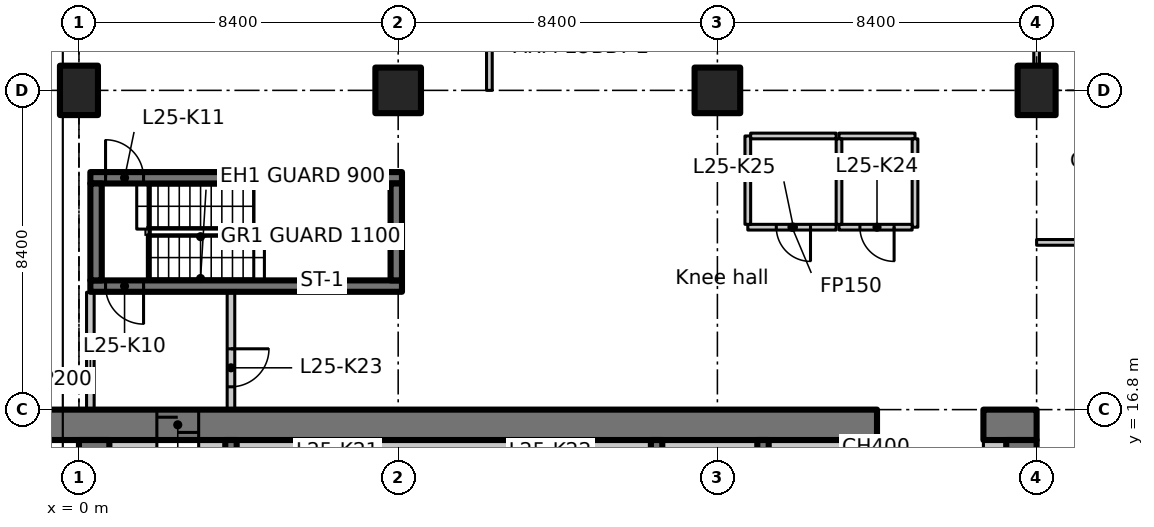
"""IFC4 building model, lengths in metres.
Left out: names, types, materials, properties, quantities, classifications, styles, units other than length and angle.
Written with IfcOpenShell. Run it as: python <this file> out.ifc"""

import sys

from ifc_helpers import new_model, si_unit, direction, frame, frame_2d, origin, origin_2d, place, context, subcontext, project, spatial, polyline, rectangle, outline, extrude, element, fill, save


model = new_model("IFC4")
c1 = context("Model", 3, precision=1e-05, world=origin(), true_north=direction((0.0, 1.0)))
c2 = subcontext(c1, "Body", "Model", "MODEL_VIEW")
j1 = project(units=[si_unit("LENGTHUNIT", "METRE"), si_unit("PLANEANGLEUNIT", "RADIAN")], contexts=[c1])
p1 = place(None, origin())
s1 = spatial("IfcSite", under=j1, at=p1, CompositionType="ELEMENT")
p2 = place(p1, origin())
s2 = spatial("IfcBuilding", under=s1, at=p2, CompositionType="ELEMENT")
p3 = place(p2, frame((0.0, 0.0, 106.1)))
s3 = spatial("IfcBuildingStorey", under=s2, at=p3, CompositionType="ELEMENT", Elevation=106.1)
p4 = place(p3, frame((0.0, 25.2, 0.0), z_axis=(0.0, 0.0, 1.0), x_axis=(1.0, 0.0, 0.0)))
e1 = element("IfcColumn", 1, at=p4, inside=s3, PredefinedType="COLUMN", context=c2, shape_type="SweptSolid", body=[
    extrude(rectangle(XDim=1.0, YDim=1.3, at=origin_2d()), origin(), (0.0, 0.0, 1.0), 3.35),
])
for number, where, z_axis, x_axis in (
    (2, (8.4, 25.2, 0.0), (0.0, 0.0, 1.0), (1.0, 0.0, 0.0)),
    (3, (16.8, 25.2, 0.0), (0.0, 0.0, 1.0), (1.0, 0.0, 0.0)),
):
    element("IfcColumn", number, at=place(p3, frame(where, z_axis=z_axis, x_axis=x_axis)), inside=s3, PredefinedType="COLUMN", context=c2, shape_type="SweptSolid", body=[
        extrude(rectangle(XDim=1.2, YDim=1.2, at=origin_2d()), origin(), (0.0, 0.0, 1.0), 3.35),
    ])
p5 = place(p3, frame((25.2, 25.2, 0.0), z_axis=(0.0, 0.0, 1.0), x_axis=(1.0, 0.0, 0.0)))
e4 = element("IfcColumn", 4, at=p5, inside=s3, PredefinedType="COLUMN", context=c2, shape_type="SweptSolid", body=[
    extrude(rectangle(XDim=1.0, YDim=1.3, at=origin_2d()), origin(), (0.0, 0.0, 1.0), 3.35),
])
p6 = place(p3, frame((-1.1, 16.4, 0.0), z_axis=(0.0, 0.0, 1.0), x_axis=(1.0, 0.0, 0.0)))
e5 = element("IfcWall", 5, at=p6, inside=s3, PredefinedType="SHEAR", context=c2, shape_type="SweptSolid", body=[
    extrude(rectangle(XDim=22.1, YDim=0.8, at=frame_2d((11.05, 0.0))), origin(), (0.0, 0.0, 1.0), 3.35),
])
p7 = place(p6, frame((3.15, 0.0, 0.0)))
e6 = element("IfcOpeningElement", 6, at=p7, cuts=e5, PredefinedType="OPENING", context=c2, shape_type="SweptSolid", body=[
    extrude(rectangle(XDim=1.1, YDim=2.3, at=frame_2d((0.55, 1.15))), frame((0.0, 0.41, 0.0), z_axis=(0.0, -1.0, 0.0), x_axis=(1.0, 0.0, 0.0)), (0.0, 0.0, 1.0), 0.82),
])
p8 = place(p3, frame((23.8, 16.4, 0.0), z_axis=(0.0, 0.0, 1.0), x_axis=(1.0, 0.0, 0.0)))
e7 = element("IfcWall", 7, at=p8, inside=s3, PredefinedType="SHEAR", context=c2, shape_type="SweptSolid", body=[
    extrude(rectangle(XDim=1.4, YDim=0.8, at=frame_2d((0.7, 0.0))), origin(), (0.0, 0.0, 1.0), 3.35),
])
p9 = place(p3, frame((0.4, 7.136, 0.0), z_axis=(0.0, 0.0, 1.0), x_axis=(0.0, 1.0, 0.0)))
e8 = element("IfcWall", 8, at=p9, inside=s3, PredefinedType="SHEAR", context=c2, shape_type="SweptSolid", body=[
    extrude(rectangle(XDim=8.864, YDim=0.8, at=frame_2d((4.432, 0.0))), origin(), (0.0, 0.0, 1.0), 3.35),
])
p10 = place(p3, frame((24.8, 12.6, 0.0), z_axis=(0.0, 0.0, 1.0), x_axis=(0.0, 1.0, 0.0)))
e9 = element("IfcWall", 9, at=p10, inside=s3, PredefinedType="SHEAR", context=c2, shape_type="SweptSolid", body=[
    extrude(rectangle(XDim=3.4, YDim=0.8, at=frame_2d((1.7, 0.0))), origin(), (0.0, 0.0, 1.0), 3.35),
])
p11 = place(p3, frame((0.8, 15.8, 0.0), z_axis=(0.0, 0.0, 1.0), x_axis=(1.0, 0.0, 0.0)))
e10 = element("IfcWall", 10, at=p11, inside=s3, PredefinedType="PARTITIONING", context=c2, shape_type="SweptSolid", body=[
    extrude(rectangle(XDim=1.25, YDim=0.4, at=frame_2d((0.625, 0.0))), origin(), (0.0, 0.0, 1.0), 3.35),
])
p12 = place(p3, frame((23.8, 15.8, 0.0), z_axis=(0.0, 0.0, 1.0), x_axis=(1.0, 0.0, 0.0)))
e11 = element("IfcWall", 11, at=p12, inside=s3, PredefinedType="PARTITIONING", context=c2, shape_type="SweptSolid", body=[
    extrude(rectangle(XDim=0.6, YDim=0.4, at=frame_2d((0.3, 0.0))), origin(), (0.0, 0.0, 1.0), 3.35),
])
for number, where, z_axis, x_axis in (
    (12, (4.0, 12.95, 0.0), (0.0, 0.0, 1.0), (0.0, 1.0, 0.0)),
    (13, (15.2, 12.95, 0.0), (0.0, 0.0, 1.0), (0.0, 1.0, 0.0)),
    (14, (18.0, 12.95, 0.0), (0.0, 0.0, 1.0), (0.0, 1.0, 0.0)),
    (15, (20.8, 12.95, 0.0), (0.0, 0.0, 1.0), (0.0, 1.0, 0.0)),
):
    element("IfcWall", number, at=place(p3, frame(where, z_axis=z_axis, x_axis=x_axis)), inside=s3, PredefinedType="SHEAR", context=c2, shape_type="SweptSolid", body=[
        extrude(rectangle(XDim=3.05, YDim=0.3, at=frame_2d((1.525, 0.0))), origin(), (0.0, 0.0, 1.0), 3.35),
    ])
p13 = place(p3, frame((8.5, 20.05, 0.0), z_axis=(0.0, 0.0, 1.0), x_axis=(-1.0, 0.0, 0.0)))
e16 = element("IfcWall", 16, at=p13, inside=s3, PredefinedType="SHEAR", context=c2, shape_type="SweptSolid", body=[
    extrude(rectangle(XDim=8.2, YDim=0.3, at=frame_2d((4.1, 0.0))), origin(), (0.0, 0.0, 1.0), 3.35),
])
p14 = place(p13, frame((6.8, 0.0, 0.0)))
e17 = element("IfcOpeningElement", 17, at=p14, cuts=e16, PredefinedType="OPENING", context=c2, shape_type="SweptSolid", body=[
    extrude(rectangle(XDim=1.0, YDim=2.1, at=frame_2d((0.5, 1.05))), frame((0.0, 0.16, 0.0), z_axis=(0.0, -1.0, 0.0), x_axis=(1.0, 0.0, 0.0)), (0.0, 0.0, 1.0), 0.32),
])
p15 = place(p3, frame((0.3, 22.9, 0.0), z_axis=(0.0, 0.0, 1.0), x_axis=(1.0, 0.0, 0.0)))
e18 = element("IfcWall", 18, at=p15, inside=s3, PredefinedType="SHEAR", context=c2, shape_type="SweptSolid", body=[
    extrude(rectangle(XDim=8.2, YDim=0.3, at=frame_2d((4.1, 0.0))), origin(), (0.0, 0.0, 1.0), 3.35),
])
p16 = place(p15, frame((0.4, 0.0, 0.0)))
e19 = element("IfcOpeningElement", 19, at=p16, cuts=e18, PredefinedType="OPENING", context=c2, shape_type="SweptSolid", body=[
    extrude(rectangle(XDim=1.0, YDim=2.1, at=frame_2d((0.5, 1.05))), frame((0.0, 0.16, 0.0), z_axis=(0.0, -1.0, 0.0), x_axis=(1.0, 0.0, 0.0)), (0.0, 0.0, 1.0), 0.32),
])
for number, where, z_axis, x_axis in (
    (20, (0.45, 20.2, 0.0), (0.0, 0.0, 1.0), (0.0, 1.0, 0.0)),
    (21, (8.35, 20.2, 0.0), (0.0, 0.0, 1.0), (0.0, 1.0, 0.0)),
):
    element("IfcWall", number, at=place(p3, frame(where, z_axis=z_axis, x_axis=x_axis)), inside=s3, PredefinedType="SHEAR", context=c2, shape_type="SweptSolid", body=[
        extrude(rectangle(XDim=2.55, YDim=0.3, at=frame_2d((1.275, 0.0))), origin(), (0.0, 0.0, 1.0), 3.35),
    ])
p17 = place(p3, frame((0.3, 16.812, 0.0), z_axis=(0.0, 0.0, 1.0), x_axis=(0.0, 1.0, 0.0)))
e22 = element("IfcWall", 22, at=p17, inside=s3, PredefinedType="PARTITIONING", context=c2, shape_type="SweptSolid", body=[
    extrude(rectangle(XDim=3.076, YDim=0.2, at=frame_2d((1.538, 0.0))), origin(), (0.0, 0.0, 1.0), 2.98),
])
p18 = place(p3, frame((4.0, 19.888, 0.0), z_axis=(0.0, 0.0, 1.0), x_axis=(0.0, -1.0, 0.0)))
e23 = element("IfcWall", 23, at=p18, inside=s3, PredefinedType="PARTITIONING", context=c2, shape_type="SweptSolid", body=[
    extrude(rectangle(XDim=3.076, YDim=0.2, at=frame_2d((1.538, 0.0))), origin(), (0.0, 0.0, 1.0), 3.35),
])
p19 = place(p18, frame((1.488, 0.0, 0.0)))
e24 = element("IfcOpeningElement", 24, at=p19, cuts=e23, PredefinedType="OPENING", context=c2, shape_type="SweptSolid", body=[
    extrude(rectangle(XDim=1.0, YDim=2.1, at=frame_2d((0.5, 1.05))), frame((0.0, 0.11, 0.0), z_axis=(0.0, -1.0, 0.0), x_axis=(1.0, 0.0, 0.0)), (0.0, 0.0, 1.0), 0.22),
])
p20 = place(p3, frame((20.0, 24.0, 0.0), z_axis=(0.0, 0.0, 1.0), x_axis=(1.0, 0.0, 0.0)))
e25 = element("IfcWall", 25, at=p20, inside=s3, PredefinedType="PARTITIONING", context=c2, shape_type="SweptSolid", body=[
    extrude(rectangle(XDim=2.0, YDim=0.15, at=frame_2d((1.0, 0.0))), origin(), (0.0, 0.0, 1.0), 3.35),
])
p21 = place(p3, frame((22.0, 23.925, 0.0), z_axis=(0.0, 0.0, 1.0), x_axis=(0.0, -1.0, 0.0)))
e26 = element("IfcWall", 26, at=p21, inside=s3, PredefinedType="PARTITIONING", context=c2, shape_type="SweptSolid", body=[
    extrude(rectangle(XDim=2.325, YDim=0.15, at=frame_2d((1.163, 0.0))), origin(), (0.0, 0.0, 1.0), 3.35),
])
p22 = place(p3, frame((21.925, 21.6, 0.0), z_axis=(0.0, 0.0, 1.0), x_axis=(-1.0, 0.0, 0.0)))
e27 = element("IfcWall", 27, at=p22, inside=s3, PredefinedType="PARTITIONING", context=c2, shape_type="SweptSolid", body=[
    extrude(rectangle(XDim=1.925, YDim=0.15, at=frame_2d((0.962, 0.0))), origin(), (0.0, 0.0, 1.0), 3.35),
])
p23 = place(p22, frame((0.475, 0.0, 0.0)))
e28 = element("IfcOpeningElement", 28, at=p23, cuts=e27, PredefinedType="OPENING", context=c2, shape_type="SweptSolid", body=[
    extrude(rectangle(XDim=0.9, YDim=2.1, at=frame_2d((0.45, 1.05))), frame((0.0, 0.085, 0.0), z_axis=(0.0, -1.0, 0.0), x_axis=(1.0, 0.0, 0.0)), (0.0, 0.0, 1.0), 0.17),
])
p24 = place(p3, frame((20.0, 21.675, 0.0), z_axis=(0.0, 0.0, 1.0), x_axis=(0.0, 1.0, 0.0)))
e29 = element("IfcWall", 29, at=p24, inside=s3, PredefinedType="PARTITIONING", context=c2, shape_type="SweptSolid", body=[
    extrude(rectangle(XDim=2.25, YDim=0.15, at=frame_2d((1.125, 0.0))), origin(), (0.0, 0.0, 1.0), 3.35),
])
p25 = place(p3, frame((19.925, 21.6, 0.0), z_axis=(0.0, 0.0, 1.0), x_axis=(-1.0, 0.0, 0.0)))
e30 = element("IfcWall", 30, at=p25, inside=s3, PredefinedType="PARTITIONING", context=c2, shape_type="SweptSolid", body=[
    extrude(rectangle(XDim=2.325, YDim=0.15, at=frame_2d((1.163, 0.0))), origin(), (0.0, 0.0, 1.0), 3.35),
])
p26 = place(p25, frame((0.675, 0.0, 0.0)))
e31 = element("IfcOpeningElement", 31, at=p26, cuts=e30, PredefinedType="OPENING", context=c2, shape_type="SweptSolid", body=[
    extrude(rectangle(XDim=0.9, YDim=2.1, at=frame_2d((0.45, 1.05))), frame((0.0, 0.085, 0.0), z_axis=(0.0, -1.0, 0.0), x_axis=(1.0, 0.0, 0.0)), (0.0, 0.0, 1.0), 0.17),
])
p27 = place(p3, frame((17.6, 21.675, 0.0), z_axis=(0.0, 0.0, 1.0), x_axis=(0.0, 1.0, 0.0)))
e32 = element("IfcWall", 32, at=p27, inside=s3, PredefinedType="PARTITIONING", context=c2, shape_type="SweptSolid", body=[
    extrude(rectangle(XDim=2.325, YDim=0.15, at=frame_2d((1.163, 0.0))), origin(), (0.0, 0.0, 1.0), 3.35),
])
p28 = place(p3, frame((17.675, 24.0, 0.0), z_axis=(0.0, 0.0, 1.0), x_axis=(1.0, 0.0, 0.0)))
e33 = element("IfcWall", 33, at=p28, inside=s3, PredefinedType="PARTITIONING", context=c2, shape_type="SweptSolid", body=[
    extrude(rectangle(XDim=2.25, YDim=0.15, at=frame_2d((1.125, 0.0))), origin(), (0.0, 0.0, 1.0), 3.35),
])
p29 = place(p3, frame((3.15, 15.8, 0.0), z_axis=(0.0, 0.0, 1.0), x_axis=(1.0, 0.0, 0.0)))
e34 = element("IfcWall", 34, at=p29, inside=s3, PredefinedType="PARTITIONING", context=c2, shape_type="SweptSolid", body=[
    extrude(rectangle(XDim=0.7, YDim=0.4, at=frame_2d((0.35, 0.0))), origin(), (0.0, 0.0, 1.0), 3.35),
])
p30 = place(p3, frame((4.15, 15.8, 0.0), z_axis=(0.0, 0.0, 1.0), x_axis=(1.0, 0.0, 0.0)))
e35 = element("IfcWall", 35, at=p30, inside=s3, PredefinedType="PARTITIONING", context=c2, shape_type="SweptSolid", body=[
    extrude(rectangle(XDim=10.9, YDim=0.4, at=frame_2d((5.45, 0.0))), origin(), (0.0, 0.0, 1.0), 3.35),
])
for number, where, z_axis, x_axis in (
    (36, (15.35, 15.8, 0.0), (0.0, 0.0, 1.0), (1.0, 0.0, 0.0)),
    (37, (18.15, 15.8, 0.0), (0.0, 0.0, 1.0), (1.0, 0.0, 0.0)),
):
    element("IfcWall", number, at=place(p3, frame(where, z_axis=z_axis, x_axis=x_axis)), inside=s3, PredefinedType="PARTITIONING", context=c2, shape_type="SweptSolid", body=[
        extrude(rectangle(XDim=2.5, YDim=0.4, at=frame_2d((1.25, 0.0))), origin(), (0.0, 0.0, 1.0), 3.35),
    ])
p31 = place(p3, frame((20.95, 15.8, 0.0), z_axis=(0.0, 0.0, 1.0), x_axis=(1.0, 0.0, 0.0)))
e38 = element("IfcWall", 38, at=p31, inside=s3, PredefinedType="PARTITIONING", context=c2, shape_type="SweptSolid", body=[
    extrude(rectangle(XDim=0.05, YDim=0.4, at=frame_2d((0.025, 0.0))), origin(), (0.0, 0.0, 1.0), 3.35),
])
p32 = place(p3, frame((25.2, 21.2, 0.0), z_axis=(0.0, 0.0, 1.0), x_axis=(1.0, 0.0, 0.0)))
e39 = element("IfcWall", 39, at=p32, inside=s3, PredefinedType="PARTITIONING", context=c2, shape_type="SweptSolid", body=[
    extrude(rectangle(XDim=4.2, YDim=0.15, at=frame_2d((2.1, 0.0))), origin(), (0.0, 0.0, 1.0), 3.33),
])
p33 = place(p3, frame((25.2, 31.0, 0.0), z_axis=(0.0, 0.0, 1.0), x_axis=(0.0, -1.0, 0.0)))
e40 = element("IfcWall", 40, at=p33, inside=s3, PredefinedType="PARTITIONING", context=c2, shape_type="SweptSolid", body=[
    extrude(outline(polyline([(0.0, 0.0), (5.13, 0.0), (5.13, 2.98), (0.0, 2.98), (0.0, 0.0)])), frame((0.0, 0.075, 0.0), z_axis=(0.0, -1.0, 0.0), x_axis=(1.0, 0.0, 0.0)), (0.0, 0.0, 1.0), 0.15),
])
p34 = place(p33, frame((1.93, 0.0, 0.0)))
e41 = element("IfcOpeningElement", 41, at=p34, cuts=e40, PredefinedType="OPENING", context=c2, shape_type="SweptSolid", body=[
    extrude(rectangle(XDim=1.1, YDim=2.1, at=frame_2d((0.55, 1.05))), frame((0.0, 0.085, 0.0), z_axis=(0.0, -1.0, 0.0), x_axis=(1.0, 0.0, 0.0)), (0.0, 0.0, 1.0), 0.17),
])
p35 = place(p3, frame((10.8, 25.2, 0.0), z_axis=(0.0, 0.0, 1.0), x_axis=(0.0, 1.0, 0.0)))
e42 = element("IfcWall", 42, at=p35, inside=s3, PredefinedType="PARTITIONING", context=c2, shape_type="SweptSolid", body=[
    extrude(rectangle(XDim=8.4, YDim=0.15, at=frame_2d((4.2, 0.0))), origin(), (0.0, 0.0, 1.0), 3.33),
])
p36 = place(p35, frame((3.3, 0.0, 0.0)))
e43 = element("IfcOpeningElement", 43, at=p36, cuts=e42, PredefinedType="OPENING", context=c2, shape_type="SweptSolid", body=[
    extrude(rectangle(XDim=1.6, YDim=2.1, at=frame_2d((0.8, 1.05))), frame((0.0, 0.085, 0.0), z_axis=(0.0, -1.0, 0.0), x_axis=(1.0, 0.0, 0.0)), (0.0, 0.0, 1.0), 0.17),
])
p37 = place(p7, origin())
e44 = element("IfcDoor", 44, at=p37, inside=s3, OperationType="SLIDING_TO_LEFT", PredefinedType="DOOR", context=c2, shape_type="SweptSolid", body=[
    extrude(rectangle(XDim=1.1, YDim=2.3, at=frame_2d((0.55, 1.15))), frame((0.0, 0.025, 0.0), z_axis=(0.0, -1.0, 0.0), x_axis=(1.0, 0.0, 0.0)), (0.0, 0.0, 1.0), 0.05),
])
fill(e6, e44)
p38 = place(p14, origin())
e45 = element("IfcDoor", 45, at=p38, inside=s3, OperationType="SINGLE_SWING_RIGHT", PredefinedType="DOOR", context=c2, shape_type="SweptSolid", body=[
    extrude(rectangle(XDim=1.0, YDim=2.1, at=frame_2d((0.5, 1.05))), frame((0.0, 0.025, 0.0), z_axis=(0.0, -1.0, 0.0), x_axis=(1.0, 0.0, 0.0)), (0.0, 0.0, 1.0), 0.05),
])
fill(e17, e45)
p39 = place(p16, origin())
e46 = element("IfcDoor", 46, at=p39, inside=s3, OperationType="SINGLE_SWING_LEFT", PredefinedType="DOOR", context=c2, shape_type="SweptSolid", body=[
    extrude(rectangle(XDim=1.0, YDim=2.1, at=frame_2d((0.5, 1.05))), frame((0.0, 0.025, 0.0), z_axis=(0.0, -1.0, 0.0), x_axis=(1.0, 0.0, 0.0)), (0.0, 0.0, 1.0), 0.05),
])
fill(e19, e46)
p40 = place(p19, origin())
e47 = element("IfcDoor", 47, at=p40, inside=s3, OperationType="SINGLE_SWING_LEFT", PredefinedType="DOOR", context=c2, shape_type="SweptSolid", body=[
    extrude(rectangle(XDim=1.0, YDim=2.1, at=frame_2d((0.5, 1.05))), frame((0.0, 0.025, 0.0), z_axis=(0.0, -1.0, 0.0), x_axis=(1.0, 0.0, 0.0)), (0.0, 0.0, 1.0), 0.05),
])
fill(e24, e47)
p41 = place(p23, origin())
e48 = element("IfcDoor", 48, at=p41, inside=s3, OperationType="SINGLE_SWING_RIGHT", PredefinedType="DOOR", context=c2, shape_type="SweptSolid", body=[
    extrude(rectangle(XDim=0.9, YDim=2.1, at=frame_2d((0.45, 1.05))), frame((0.0, 0.025, 0.0), z_axis=(0.0, -1.0, 0.0), x_axis=(1.0, 0.0, 0.0)), (0.0, 0.0, 1.0), 0.05),
])
fill(e28, e48)
p42 = place(p26, origin())
e49 = element("IfcDoor", 49, at=p42, inside=s3, OperationType="SINGLE_SWING_LEFT", PredefinedType="DOOR", context=c2, shape_type="SweptSolid", body=[
    extrude(rectangle(XDim=0.9, YDim=2.1, at=frame_2d((0.45, 1.05))), frame((0.0, 0.025, 0.0), z_axis=(0.0, -1.0, 0.0), x_axis=(1.0, 0.0, 0.0)), (0.0, 0.0, 1.0), 0.05),
])
fill(e31, e49)
save(model, sys.argv[1])
